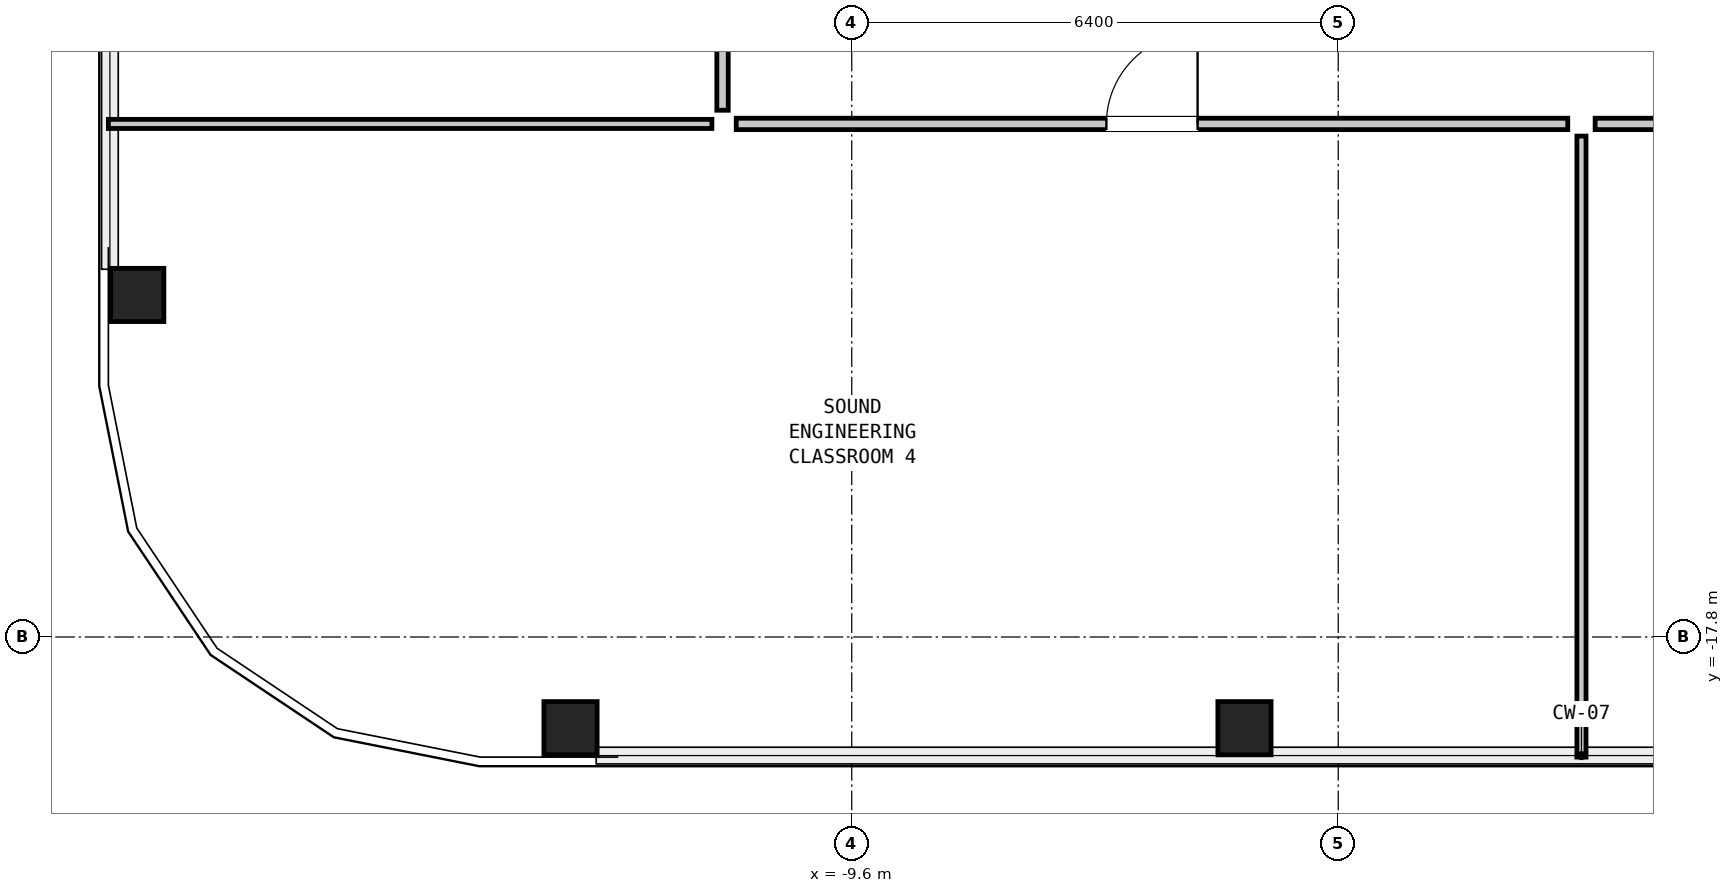
"""IFC4 building model, lengths in metres.
Left out: names, types, materials, properties, quantities, classifications, styles, units other than length and angle.
Written with IfcOpenShell. Run it as: python <this file> out.ifc"""

import sys

from ifc_helpers import new_model, si_unit, direction, frame, frame_2d, origin, origin_2d, place, context, subcontext, project, spatial, rectangle, hollow_rectangle, extrude, element, fill, save


model = new_model("IFC4")
c1 = context("Model", 3, precision=1e-05, world=origin(), true_north=direction((0.0, 1.0)))
c2 = subcontext(c1, "Body", "Model", "MODEL_VIEW")
j1 = project(units=[si_unit("LENGTHUNIT", "METRE"), si_unit("PLANEANGLEUNIT", "RADIAN")], contexts=[c1])
p1 = place(None, origin())
s1 = spatial("IfcSite", under=j1, at=p1, CompositionType="ELEMENT")
p2 = place(p1, origin())
s2 = spatial("IfcBuilding", under=s1, at=p2, CompositionType="ELEMENT")
p3 = place(p2, frame((0.0, 0.0, 226.95)))
s3 = spatial("IfcBuildingStorey", under=s2, at=p3, CompositionType="ELEMENT", Elevation=226.95)
for number, where, z_axis, x_axis in (
    (1, (-13.3, -19.0, 0.0), (0.0, 0.0, 1.0), (1.0, 0.0, 0.0)),
    (2, (-4.433, -19.0, 0.0), (0.0, 0.0, 1.0), (1.0, 0.0, 0.0)),
    (3, (-19.0, -13.3, 0.0), (0.0, 0.0, 1.0), (0.0, 1.0, 0.0)),
):
    element("IfcColumn", number, at=place(p3, frame(where, z_axis=z_axis, x_axis=x_axis)), inside=s3, PredefinedType="COLUMN", context=c2, shape_type="SweptSolid", body=[
        extrude(hollow_rectangle(XDim=0.7, YDim=0.7, WallThickness=0.045, at=origin_2d()), origin(), (0.0, 0.0, 1.0), 4.35),
    ])
p4 = place(p3, frame((-19.38, -11.05, 0.0), z_axis=(0.0, 0.0, 1.0), x_axis=(1.0, 0.0, 0.0)))
e4 = element("IfcWall", 4, at=p4, inside=s3, PredefinedType="PARTITIONING", context=c2, shape_type="SweptSolid", body=[
    extrude(rectangle(XDim=7.94, YDim=0.12, at=frame_2d((3.97, 0.0))), origin(), (0.0, 0.0, 1.0), 2.25),
])
p5 = place(p3, frame((0.0, -19.38, 0.0), z_axis=(0.0, 0.0, 1.0), x_axis=(0.0, 1.0, 0.0)))
e5 = element("IfcWall", 5, at=p5, inside=s3, PredefinedType="PARTITIONING", context=c2, shape_type="SweptSolid", body=[
    extrude(rectangle(XDim=8.17, YDim=0.12, at=frame_2d((4.085, 0.0))), origin(), (0.0, 0.0, 1.0), 2.25),
])
p6 = place(p3, frame((-11.12, -11.05, 0.0), z_axis=(0.0, 0.0, 1.0), x_axis=(1.0, 0.0, 0.0)))
e6 = element("IfcWall", 6, at=p6, inside=s3, PredefinedType="PARTITIONING", context=c2, shape_type="SweptSolid", body=[
    extrude(rectangle(XDim=10.94, YDim=0.15, at=frame_2d((5.47, 0.0))), origin(), (0.0, 0.0, 1.0), 2.25),
])
p7 = place(p6, frame((4.87, 0.0, 0.0)))
e7 = element("IfcOpeningElement", 7, at=p7, cuts=e6, PredefinedType="OPENING", context=c2, shape_type="SweptSolid", body=[
    extrude(rectangle(XDim=1.2, YDim=2.1, at=frame_2d((0.6, 1.05))), frame((0.0, 0.087, 0.0), z_axis=(0.0, -1.0, 0.0), x_axis=(1.0, 0.0, 0.0)), (0.0, 0.0, 1.0), 0.174),
])
p8 = place(p3, frame((0.18, -11.05, 0.0), z_axis=(0.0, 0.0, 1.0), x_axis=(1.0, 0.0, 0.0)))
e8 = element("IfcWall", 8, at=p8, inside=s3, PredefinedType="PARTITIONING", context=c2, shape_type="SweptSolid", body=[
    extrude(rectangle(XDim=11.29, YDim=0.15, at=frame_2d((5.645, 0.0))), origin(), (0.0, 0.0, 1.0), 2.25),
])
p9 = place(p8, frame((5.045, 0.0, 0.0)))
e9 = element("IfcOpeningElement", 9, at=p9, cuts=e8, PredefinedType="OPENING", context=c2, shape_type="SweptSolid", body=[
    extrude(rectangle(XDim=1.2, YDim=2.1, at=frame_2d((0.6, 1.05))), frame((0.0, 0.087, 0.0), z_axis=(0.0, -1.0, 0.0), x_axis=(1.0, 0.0, 0.0)), (0.0, 0.0, 1.0), 0.174),
])
p10 = place(p3, frame((-11.3, -10.87, 0.0), z_axis=(0.0, 0.0, 1.0), x_axis=(0.0, 1.0, 0.0)))
e10 = element("IfcWall", 10, at=p10, inside=s3, PredefinedType="PARTITIONING", context=c2, shape_type="SweptSolid", body=[
    extrude(rectangle(XDim=10.69, YDim=0.15, at=frame_2d((5.345, 0.0))), origin(), (0.0, 0.0, 1.0), 4.07),
])
p11 = place(p10, frame((4.745, 0.0, 0.0)))
e11 = element("IfcOpeningElement", 11, at=p11, cuts=e10, PredefinedType="OPENING", context=c2, shape_type="SweptSolid", body=[
    extrude(rectangle(XDim=1.2, YDim=2.1, at=frame_2d((0.6, 1.05))), frame((0.0, 0.087, 0.0), z_axis=(0.0, -1.0, 0.0), x_axis=(1.0, 0.0, 0.0)), (0.0, 0.0, 1.0), 0.174),
])
p12 = place(p7, origin())
e12 = element("IfcDoor", 12, at=p12, inside=s3, OperationType="SINGLE_SWING_RIGHT", PredefinedType="DOOR", context=c2, shape_type="SweptSolid", body=[
    extrude(rectangle(XDim=1.2, YDim=2.1, at=frame_2d((0.6, 1.05))), frame((0.0, 0.025, 0.0), z_axis=(0.0, -1.0, 0.0), x_axis=(1.0, 0.0, 0.0)), (0.0, 0.0, 1.0), 0.05),
])
fill(e7, e12)
save(model, sys.argv[1])
